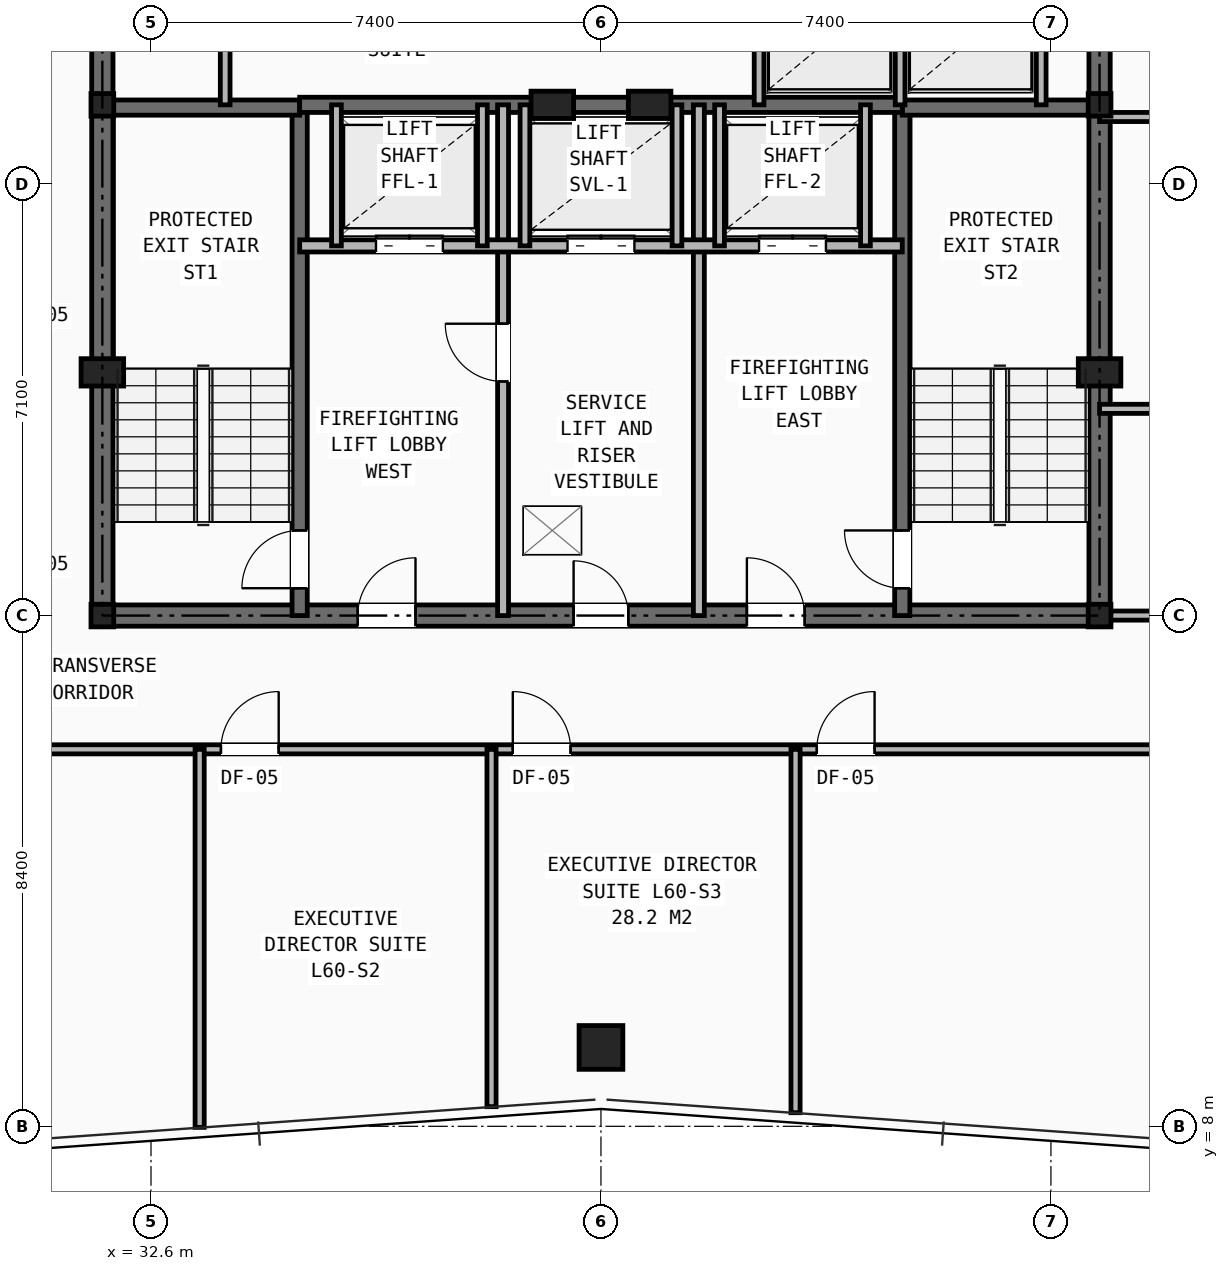
"""IFC4 building model, lengths in metres.
Left out: names, types, materials, properties, quantities, classifications, styles, units other than length and angle.
Written with IfcOpenShell. Run it as: python <this file> out.ifc"""

import sys

from ifc_helpers import new_model, si_unit, direction, frame, frame_2d, origin, origin_2d, place, context, subcontext, project, spatial, rectangle, hollow_rectangle, i_section, extrude, element, fill, save


model = new_model("IFC4")
c1 = context("Model", 3, precision=1e-05, world=origin(), true_north=direction((0.0, 1.0)))
c2 = subcontext(c1, "Body", "Model", "MODEL_VIEW")
j1 = project(units=[si_unit("LENGTHUNIT", "METRE"), si_unit("PLANEANGLEUNIT", "RADIAN")], contexts=[c1])
p1 = place(None, origin())
s1 = spatial("IfcSite", under=j1, at=p1, CompositionType="ELEMENT")
p2 = place(p1, origin())
s2 = spatial("IfcBuilding", under=s1, at=p2, CompositionType="ELEMENT")
p3 = place(p2, frame((0.0, 0.0, 211.9)))
s3 = spatial("IfcBuildingStorey", under=s2, at=p3, CompositionType="ELEMENT", Elevation=211.9)
for number, where, z_axis, x_axis in (
    (1, (31.8, 16.4, 0.0), (0.0, 0.0, 1.0), (1.0, 0.0, 0.0)),
    (2, (48.2, 16.4, 0.0), (0.0, 0.0, 1.0), (1.0, 0.0, 0.0)),
    (3, (31.8, 24.8, 0.0), (0.0, 0.0, 1.0), (1.0, 0.0, 0.0)),
    (4, (48.2, 24.8, 0.0), (0.0, 0.0, 1.0), (1.0, 0.0, 0.0)),
):
    element("IfcColumn", number, at=place(p3, frame(where, z_axis=z_axis, x_axis=x_axis)), inside=s3, PredefinedType="COLUMN", context=c2, shape_type="SweptSolid", body=[
        extrude(i_section(OverallWidth=0.374, OverallDepth=0.372, WebThickness=0.016, FlangeThickness=0.026, at=origin_2d()), origin(), (0.0, 0.0, 1.0), 3.5),
    ])
for number, where, z_axis, x_axis in (
    (5, (31.8, 20.4, 0.0), (0.0, 0.0, 1.0), (1.0, 0.0, 0.0)),
    (6, (48.2, 20.4, 0.0), (0.0, 0.0, 1.0), (1.0, 0.0, 0.0)),
    (7, (39.2, 24.8, 0.0), (0.0, 0.0, 1.0), (1.0, 0.0, 0.0)),
    (8, (40.8, 24.8, 0.0), (0.0, 0.0, 1.0), (1.0, 0.0, 0.0)),
):
    element("IfcColumn", number, at=place(p3, frame(where, z_axis=z_axis, x_axis=x_axis)), inside=s3, PredefinedType="PILASTER", context=c2, shape_type="SweptSolid", body=[
        extrude(rectangle(XDim=0.7, YDim=0.45, at=origin_2d()), origin(), (0.0, 0.0, 1.0), 3.5),
    ])
p4 = place(p3, frame((40.0, 9.297, 0.0), z_axis=(0.0, 0.0, 1.0), x_axis=(1.0, 0.0, 0.0)))
e9 = element("IfcColumn", 9, at=p4, inside=s3, PredefinedType="COLUMN", context=c2, shape_type="SweptSolid", body=[
    extrude(hollow_rectangle(XDim=0.72, YDim=0.72, WallThickness=0.05, at=origin_2d()), origin(), (0.0, 0.0, 1.0), 3.5),
])
p5 = place(p3, frame((31.8, 16.4, 0.0), z_axis=(0.0, 0.0, 1.0), x_axis=(1.0, 0.0, 0.0)))
e10 = element("IfcWall", 10, at=p5, inside=s3, PredefinedType="SHEAR", context=c2, shape_type="SweptSolid", body=[
    extrude(rectangle(XDim=16.4, YDim=0.35, at=frame_2d((8.2, 0.0))), origin(), (0.0, 0.0, 1.0), 3.25),
])
p6 = place(p5, frame((7.75, 0.0, 0.0)))
e11 = element("IfcOpeningElement", 11, at=p6, cuts=e10, PredefinedType="OPENING", context=c2, shape_type="SweptSolid", body=[
    extrude(rectangle(XDim=0.9, YDim=2.1, at=frame_2d((0.45, 1.05))), frame((0.0, 0.185, 0.0), z_axis=(0.0, -1.0, 0.0), x_axis=(1.0, 0.0, 0.0)), (0.0, 0.0, 1.0), 0.37),
])
p7 = place(p5, frame((4.2, 0.0, 0.0)))
e12 = element("IfcOpeningElement", 12, at=p7, cuts=e10, PredefinedType="OPENING", context=c2, shape_type="SweptSolid", body=[
    extrude(rectangle(XDim=0.95, YDim=2.1, at=frame_2d((0.475, 1.05))), frame((0.0, 0.185, 0.0), z_axis=(0.0, -1.0, 0.0), x_axis=(1.0, 0.0, 0.0)), (0.0, 0.0, 1.0), 0.37),
])
p8 = place(p5, frame((10.6, 0.0, 0.0)))
e13 = element("IfcOpeningElement", 13, at=p8, cuts=e10, PredefinedType="OPENING", context=c2, shape_type="SweptSolid", body=[
    extrude(rectangle(XDim=0.95, YDim=2.1, at=frame_2d((0.475, 1.05))), frame((0.0, 0.185, 0.0), z_axis=(0.0, -1.0, 0.0), x_axis=(1.0, 0.0, 0.0)), (0.0, 0.0, 1.0), 0.37),
])
p9 = place(p3, frame((31.8, 16.4, 0.0), z_axis=(0.0, 0.0, 1.0), x_axis=(0.0, 1.0, 0.0)))
e14 = element("IfcWall", 14, at=p9, inside=s3, PredefinedType="SHEAR", context=c2, shape_type="SweptSolid", body=[
    extrude(rectangle(XDim=14.8, YDim=0.35, at=frame_2d((7.4, 0.0))), origin(), (0.0, 0.0, 1.0), 3.25),
])
p10 = place(p9, frame((11.0, 0.0, 0.0)))
e15 = element("IfcOpeningElement", 15, at=p10, cuts=e14, PredefinedType="OPENING", context=c2, shape_type="SweptSolid", body=[
    extrude(rectangle(XDim=1.1, YDim=2.15, at=frame_2d((0.55, 1.075))), frame((0.0, 0.185, 0.0), z_axis=(0.0, -1.0, 0.0), x_axis=(1.0, 0.0, 0.0)), (0.0, 0.0, 1.0), 0.37),
])
p11 = place(p3, frame((48.2, 16.4, 0.0), z_axis=(0.0, 0.0, 1.0), x_axis=(0.0, 1.0, 0.0)))
e16 = element("IfcWall", 16, at=p11, inside=s3, PredefinedType="SHEAR", context=c2, shape_type="SweptSolid", body=[
    extrude(rectangle(XDim=14.8, YDim=0.35, at=frame_2d((7.4, 0.0))), origin(), (0.0, 0.0, 1.0), 3.25),
])
p12 = place(p11, frame((11.0, 0.0, 0.0)))
e17 = element("IfcOpeningElement", 17, at=p12, cuts=e16, PredefinedType="OPENING", context=c2, shape_type="SweptSolid", body=[
    extrude(rectangle(XDim=1.1, YDim=2.15, at=frame_2d((0.55, 1.075))), frame((0.0, 0.185, 0.0), z_axis=(0.0, -1.0, 0.0), x_axis=(1.0, 0.0, 0.0)), (0.0, 0.0, 1.0), 0.37),
])
p13 = place(p3, frame((35.045, 16.4, 0.0), z_axis=(0.0, 0.0, 1.0), x_axis=(0.0, 1.0, 0.0)))
e18 = element("IfcWall", 18, at=p13, inside=s3, PredefinedType="SHEAR", context=c2, shape_type="SweptSolid", body=[
    extrude(rectangle(XDim=8.4, YDim=0.25, at=frame_2d((4.2, 0.0))), origin(), (0.0, 0.0, 1.0), 3.25),
])
p14 = place(p13, frame((0.45, 0.0, 0.0)))
e19 = element("IfcOpeningElement", 19, at=p14, cuts=e18, PredefinedType="OPENING", context=c2, shape_type="SweptSolid", body=[
    extrude(rectangle(XDim=0.95, YDim=2.1, at=frame_2d((0.475, 1.05))), frame((0.0, 0.135, 0.0), z_axis=(0.0, -1.0, 0.0), x_axis=(1.0, 0.0, 0.0)), (0.0, 0.0, 1.0), 0.27),
])
p15 = place(p3, frame((31.8, 24.755, 0.0), z_axis=(0.0, 0.0, 1.0), x_axis=(1.0, 0.0, 0.0)))
e20 = element("IfcWall", 20, at=p15, inside=s3, PredefinedType="SHEAR", context=c2, shape_type="SweptSolid", body=[
    extrude(rectangle(XDim=3.245, YDim=0.25, at=frame_2d((1.623, 0.0))), origin(), (0.0, 0.0, 1.0), 3.25),
])
p16 = place(p3, frame((44.955, 16.4, 0.0), z_axis=(0.0, 0.0, 1.0), x_axis=(0.0, 1.0, 0.0)))
e21 = element("IfcWall", 21, at=p16, inside=s3, PredefinedType="SHEAR", context=c2, shape_type="SweptSolid", body=[
    extrude(rectangle(XDim=8.4, YDim=0.25, at=frame_2d((4.2, 0.0))), origin(), (0.0, 0.0, 1.0), 3.25),
])
p17 = place(p16, frame((0.45, 0.0, 0.0)))
e22 = element("IfcOpeningElement", 22, at=p17, cuts=e21, PredefinedType="OPENING", context=c2, shape_type="SweptSolid", body=[
    extrude(rectangle(XDim=0.95, YDim=2.1, at=frame_2d((0.475, 1.05))), frame((0.0, 0.135, 0.0), z_axis=(0.0, -1.0, 0.0), x_axis=(1.0, 0.0, 0.0)), (0.0, 0.0, 1.0), 0.27),
])
p18 = place(p3, frame((44.955, 24.755, 0.0), z_axis=(0.0, 0.0, 1.0), x_axis=(1.0, 0.0, 0.0)))
e23 = element("IfcWall", 23, at=p18, inside=s3, PredefinedType="SHEAR", context=c2, shape_type="SweptSolid", body=[
    extrude(rectangle(XDim=3.245, YDim=0.25, at=frame_2d((1.623, 0.0))), origin(), (0.0, 0.0, 1.0), 3.25),
])
p19 = place(p3, frame((35.045, 24.8, 0.0), z_axis=(0.0, 0.0, 1.0), x_axis=(1.0, 0.0, 0.0)))
e24 = element("IfcWall", 24, at=p19, inside=s3, PredefinedType="SHEAR", context=c2, shape_type="SweptSolid", body=[
    extrude(rectangle(XDim=9.91, YDim=0.25, at=frame_2d((4.955, 0.0))), origin(), (0.0, 0.0, 1.0), 3.25),
])
p20 = place(p3, frame((38.39, 16.4, 0.0), z_axis=(0.0, 0.0, 1.0), x_axis=(0.0, 1.0, 0.0)))
e25 = element("IfcWall", 25, at=p20, inside=s3, PredefinedType="PARTITIONING", context=c2, shape_type="SweptSolid", body=[
    extrude(rectangle(XDim=8.4, YDim=0.18, at=frame_2d((4.2, 0.0))), origin(), (0.0, 0.0, 1.0), 2.978),
])
p21 = place(p20, frame((3.85, 0.0, 0.0)))
e26 = element("IfcOpeningElement", 26, at=p21, cuts=e25, PredefinedType="OPENING", context=c2, shape_type="SweptSolid", body=[
    extrude(rectangle(XDim=0.95, YDim=2.1, at=frame_2d((0.475, 1.05))), frame((0.0, 0.1, 0.0), z_axis=(0.0, -1.0, 0.0), x_axis=(1.0, 0.0, 0.0)), (0.0, 0.0, 1.0), 0.2),
])
p22 = place(p3, frame((41.61, 16.4, 0.0), z_axis=(0.0, 0.0, 1.0), x_axis=(0.0, 1.0, 0.0)))
e27 = element("IfcWall", 27, at=p22, inside=s3, PredefinedType="PARTITIONING", context=c2, shape_type="SweptSolid", body=[
    extrude(rectangle(XDim=8.4, YDim=0.18, at=frame_2d((4.2, 0.0))), origin(), (0.0, 0.0, 1.0), 2.978),
])
p23 = place(p3, frame((35.045, 22.48, 0.0), z_axis=(0.0, 0.0, 1.0), x_axis=(1.0, 0.0, 0.0)))
e28 = element("IfcWall", 28, at=p23, inside=s3, PredefinedType="SOLIDWALL", context=c2, shape_type="SweptSolid", body=[
    extrude(rectangle(XDim=9.91, YDim=0.2, at=frame_2d((4.955, 0.0))), origin(), (0.0, 0.0, 1.0), 3.25),
])
p24 = place(p23, frame((1.255, 0.0, 0.0)))
e29 = element("IfcOpeningElement", 29, at=p24, cuts=e28, PredefinedType="OPENING", context=c2, shape_type="SweptSolid", body=[
    extrude(rectangle(XDim=1.1, YDim=2.15, at=frame_2d((0.55, 1.075))), frame((0.0, 0.11, 0.0), z_axis=(0.0, -1.0, 0.0), x_axis=(1.0, 0.0, 0.0)), (0.0, 0.0, 1.0), 0.22),
])
p25 = place(p23, frame((7.555, 0.0, 0.0)))
e30 = element("IfcOpeningElement", 30, at=p25, cuts=e28, PredefinedType="OPENING", context=c2, shape_type="SweptSolid", body=[
    extrude(rectangle(XDim=1.1, YDim=2.15, at=frame_2d((0.55, 1.075))), frame((0.0, 0.11, 0.0), z_axis=(0.0, -1.0, 0.0), x_axis=(1.0, 0.0, 0.0)), (0.0, 0.0, 1.0), 0.22),
])
p26 = place(p23, frame((4.405, 0.0, 0.0)))
e31 = element("IfcOpeningElement", 31, at=p26, cuts=e28, PredefinedType="OPENING", context=c2, shape_type="SweptSolid", body=[
    extrude(rectangle(XDim=1.1, YDim=2.15, at=frame_2d((0.55, 1.075))), frame((0.0, 0.11, 0.0), z_axis=(0.0, -1.0, 0.0), x_axis=(1.0, 0.0, 0.0)), (0.0, 0.0, 1.0), 0.22),
])
for number, where, z_axis, x_axis in (
    (32, (35.65, 22.48, 0.0), (0.0, 0.0, 1.0), (0.0, 1.0, 0.0)),
    (33, (38.05, 22.48, 0.0), (0.0, 0.0, 1.0), (0.0, 1.0, 0.0)),
    (34, (41.95, 22.48, 0.0), (0.0, 0.0, 1.0), (0.0, 1.0, 0.0)),
    (35, (44.35, 22.48, 0.0), (0.0, 0.0, 1.0), (0.0, 1.0, 0.0)),
    (36, (38.75, 22.48, 0.0), (0.0, 0.0, 1.0), (0.0, 1.0, 0.0)),
    (37, (41.25, 22.48, 0.0), (0.0, 0.0, 1.0), (0.0, 1.0, 0.0)),
):
    element("IfcWall", number, at=place(p3, frame(where, z_axis=z_axis, x_axis=x_axis)), inside=s3, PredefinedType="SOLIDWALL", context=c2, shape_type="SweptSolid", body=[
        extrude(rectangle(XDim=2.32, YDim=0.16, at=frame_2d((1.16, 0.0))), origin(), (0.0, 0.0, 1.0), 3.25),
    ])
for number, where, z_axis, x_axis in (
    (38, (33.82, 24.8, 0.0), (0.0, 0.0, 1.0), (0.0, 1.0, 0.0)),
    (39, (42.6, 24.8, 0.0), (0.0, 0.0, 1.0), (0.0, 1.0, 0.0)),
    (40, (44.92, 24.8, 0.0), (0.0, 0.0, 1.0), (0.0, 1.0, 0.0)),
    (41, (47.24, 24.8, 0.0), (0.0, 0.0, 1.0), (0.0, 1.0, 0.0)),
):
    element("IfcWall", number, at=place(p3, frame(where, z_axis=z_axis, x_axis=x_axis)), inside=s3, PredefinedType="SOLIDWALL", context=c2, shape_type="SweptSolid", body=[
        extrude(rectangle(XDim=2.08, YDim=0.16, at=frame_2d((1.04, 0.0))), origin(), (0.0, 0.0, 1.0), 3.25),
    ])
p27 = place(p3, frame((48.2, 16.4, 0.0), z_axis=(0.0, 0.0, 1.0), x_axis=(1.0, 0.0, 0.0)))
e42 = element("IfcWall", 42, at=p27, inside=s3, PredefinedType="PARTITIONING", context=c2, shape_type="SweptSolid", body=[
    extrude(rectangle(XDim=16.034, YDim=0.15, at=frame_2d((8.017, 0.0))), origin(), (0.0, 0.0, 1.0), 2.265),
])
p28 = place(p3, frame((25.5, 14.2, 0.0), z_axis=(0.0, 0.0, 1.0), x_axis=(1.0, 0.0, 0.0)))
e43 = element("IfcWall", 43, at=p28, inside=s3, PredefinedType="PARTITIONING", context=c2, shape_type="SweptSolid", body=[
    extrude(rectangle(XDim=29.0, YDim=0.15, at=frame_2d((14.5, 0.0))), origin(), (0.0, 0.0, 1.0), 2.265),
])
p29 = place(p28, frame((0.85, 0.0, 0.0)))
e44 = element("IfcOpeningElement", 44, at=p29, cuts=e43, PredefinedType="OPENING", context=c2, shape_type="SweptSolid", body=[
    extrude(rectangle(XDim=0.95, YDim=2.1, at=frame_2d((0.475, 1.05))), frame((0.0, 0.085, 0.0), z_axis=(0.0, -1.0, 0.0), x_axis=(1.0, 0.0, 0.0)), (0.0, 0.0, 1.0), 0.17),
])
p30 = place(p28, frame((8.25, 0.0, 0.0)))
e45 = element("IfcOpeningElement", 45, at=p30, cuts=e43, PredefinedType="OPENING", context=c2, shape_type="SweptSolid", body=[
    extrude(rectangle(XDim=0.95, YDim=2.1, at=frame_2d((0.475, 1.05))), frame((0.0, 0.085, 0.0), z_axis=(0.0, -1.0, 0.0), x_axis=(1.0, 0.0, 0.0)), (0.0, 0.0, 1.0), 0.17),
])
p31 = place(p28, frame((13.05, 0.0, 0.0)))
e46 = element("IfcOpeningElement", 46, at=p31, cuts=e43, PredefinedType="OPENING", context=c2, shape_type="SweptSolid", body=[
    extrude(rectangle(XDim=0.95, YDim=2.1, at=frame_2d((0.475, 1.05))), frame((0.0, 0.085, 0.0), z_axis=(0.0, -1.0, 0.0), x_axis=(1.0, 0.0, 0.0)), (0.0, 0.0, 1.0), 0.17),
])
p32 = place(p28, frame((18.05, 0.0, 0.0)))
e47 = element("IfcOpeningElement", 47, at=p32, cuts=e43, PredefinedType="OPENING", context=c2, shape_type="SweptSolid", body=[
    extrude(rectangle(XDim=0.95, YDim=2.1, at=frame_2d((0.475, 1.05))), frame((0.0, 0.085, 0.0), z_axis=(0.0, -1.0, 0.0), x_axis=(1.0, 0.0, 0.0)), (0.0, 0.0, 1.0), 0.17),
])
p33 = place(p3, frame((33.4, 7.982, 0.0), z_axis=(0.0, 0.0, 1.0), x_axis=(0.0, 1.0, 0.0)))
e48 = element("IfcWall", 48, at=p33, inside=s3, PredefinedType="PARTITIONING", context=c2, shape_type="SweptSolid", body=[
    extrude(rectangle(XDim=6.218, YDim=0.15, at=frame_2d((3.109, 0.0))), origin(), (0.0, 0.0, 1.0), 2.628),
])
p34 = place(p3, frame((38.2, 8.323, 0.0), z_axis=(0.0, 0.0, 1.0), x_axis=(0.0, 1.0, 0.0)))
e49 = element("IfcWall", 49, at=p34, inside=s3, PredefinedType="PARTITIONING", context=c2, shape_type="SweptSolid", body=[
    extrude(rectangle(XDim=5.877, YDim=0.15, at=frame_2d((2.938, 0.0))), origin(), (0.0, 0.0, 1.0), 2.265),
])
p35 = place(p3, frame((43.2, 8.224, 0.0), z_axis=(0.0, 0.0, 1.0), x_axis=(0.0, 1.0, 0.0)))
e50 = element("IfcWall", 50, at=p35, inside=s3, PredefinedType="PARTITIONING", context=c2, shape_type="SweptSolid", body=[
    extrude(rectangle(XDim=5.976, YDim=0.15, at=frame_2d((2.988, 0.0))), origin(), (0.0, 0.0, 1.0), 2.628),
])
p36 = place(p3, frame((48.2, 19.8, 0.0), z_axis=(0.0, 0.0, 1.0), x_axis=(1.0, 0.0, 0.0)))
e51 = element("IfcWall", 51, at=p36, inside=s3, PredefinedType="PARTITIONING", context=c2, shape_type="SweptSolid", body=[
    extrude(rectangle(XDim=13.736, YDim=0.15, at=frame_2d((6.868, 0.0))), origin(), (0.0, 0.0, 1.0), 2.265),
])
p37 = place(p36, frame((1.4, 0.0, 0.0)))
e52 = element("IfcOpeningElement", 52, at=p37, cuts=e51, PredefinedType="OPENING", context=c2, shape_type="SweptSolid", body=[
    extrude(rectangle(XDim=0.95, YDim=2.1, at=frame_2d((0.475, 1.05))), frame((0.0, 0.085, 0.0), z_axis=(0.0, -1.0, 0.0), x_axis=(1.0, 0.0, 0.0)), (0.0, 0.0, 1.0), 0.17),
])
p38 = place(p3, frame((48.2, 24.6, 0.0), z_axis=(0.0, 0.0, 1.0), x_axis=(1.0, 0.0, 0.0)))
e53 = element("IfcWall", 53, at=p38, inside=s3, PredefinedType="PARTITIONING", context=c2, shape_type="SweptSolid", body=[
    extrude(rectangle(XDim=10.492, YDim=0.15, at=frame_2d((5.246, 0.0))), origin(), (0.0, 0.0, 1.0), 2.628),
])
p39 = place(p38, frame((1.4, 0.0, 0.0)))
e54 = element("IfcOpeningElement", 54, at=p39, cuts=e53, PredefinedType="OPENING", context=c2, shape_type="SweptSolid", body=[
    extrude(rectangle(XDim=0.95, YDim=2.1, at=frame_2d((0.475, 1.05))), frame((0.0, 0.085, 0.0), z_axis=(0.0, -1.0, 0.0), x_axis=(1.0, 0.0, 0.0)), (0.0, 0.0, 1.0), 0.17),
])
p40 = place(p6, origin())
e55 = element("IfcDoor", 55, at=p40, inside=s3, OperationType="SINGLE_SWING_LEFT", PredefinedType="DOOR", context=c2, shape_type="SweptSolid", body=[
    extrude(rectangle(XDim=0.9, YDim=2.1, at=frame_2d((0.45, 1.05))), frame((0.0, 0.025, 0.0), z_axis=(0.0, -1.0, 0.0), x_axis=(1.0, 0.0, 0.0)), (0.0, 0.0, 1.0), 0.05),
])
fill(e11, e55)
p41 = place(p21, origin())
e56 = element("IfcDoor", 56, at=p41, inside=s3, OperationType="SINGLE_SWING_RIGHT", PredefinedType="DOOR", context=c2, shape_type="SweptSolid", body=[
    extrude(rectangle(XDim=0.95, YDim=2.1, at=frame_2d((0.475, 1.05))), frame((0.0, 0.025, 0.0), z_axis=(0.0, -1.0, 0.0), x_axis=(1.0, 0.0, 0.0)), (0.0, 0.0, 1.0), 0.05),
])
fill(e26, e56)
p42 = place(p14, origin())
e57 = element("IfcDoor", 57, at=p42, inside=s3, OperationType="SINGLE_SWING_LEFT", PredefinedType="DOOR", context=c2, shape_type="SweptSolid", body=[
    extrude(rectangle(XDim=0.95, YDim=2.1, at=frame_2d((0.475, 1.05))), frame((0.0, 0.025, 0.0), z_axis=(0.0, -1.0, 0.0), x_axis=(1.0, 0.0, 0.0)), (0.0, 0.0, 1.0), 0.05),
])
fill(e19, e57)
p43 = place(p17, origin())
e58 = element("IfcDoor", 58, at=p43, inside=s3, OperationType="SINGLE_SWING_RIGHT", PredefinedType="DOOR", context=c2, shape_type="SweptSolid", body=[
    extrude(rectangle(XDim=0.95, YDim=2.1, at=frame_2d((0.475, 1.05))), frame((0.0, 0.025, 0.0), z_axis=(0.0, -1.0, 0.0), x_axis=(1.0, 0.0, 0.0)), (0.0, 0.0, 1.0), 0.05),
])
fill(e22, e58)
p44 = place(p7, origin())
e59 = element("IfcDoor", 59, at=p44, inside=s3, OperationType="SINGLE_SWING_RIGHT", PredefinedType="DOOR", context=c2, shape_type="SweptSolid", body=[
    extrude(rectangle(XDim=0.95, YDim=2.1, at=frame_2d((0.475, 1.05))), frame((0.0, 0.025, 0.0), z_axis=(0.0, -1.0, 0.0), x_axis=(1.0, 0.0, 0.0)), (0.0, 0.0, 1.0), 0.05),
])
fill(e12, e59)
p45 = place(p8, origin())
e60 = element("IfcDoor", 60, at=p45, inside=s3, OperationType="SINGLE_SWING_LEFT", PredefinedType="DOOR", context=c2, shape_type="SweptSolid", body=[
    extrude(rectangle(XDim=0.95, YDim=2.1, at=frame_2d((0.475, 1.05))), frame((0.0, 0.025, 0.0), z_axis=(0.0, -1.0, 0.0), x_axis=(1.0, 0.0, 0.0)), (0.0, 0.0, 1.0), 0.05),
])
fill(e13, e60)
p46 = place(p24, origin())
e61 = element("IfcDoor", 61, at=p46, inside=s3, OperationType="DOUBLE_DOOR_SLIDING", PredefinedType="DOOR", context=c2, shape_type="SweptSolid", body=[
    extrude(rectangle(XDim=1.1, YDim=2.15, at=frame_2d((0.55, 1.075))), frame((0.0, 0.025, 0.0), z_axis=(0.0, -1.0, 0.0), x_axis=(1.0, 0.0, 0.0)), (0.0, 0.0, 1.0), 0.05),
])
fill(e29, e61)
p47 = place(p25, origin())
e62 = element("IfcDoor", 62, at=p47, inside=s3, OperationType="DOUBLE_DOOR_SLIDING", PredefinedType="DOOR", context=c2, shape_type="SweptSolid", body=[
    extrude(rectangle(XDim=1.1, YDim=2.15, at=frame_2d((0.55, 1.075))), frame((0.0, 0.025, 0.0), z_axis=(0.0, -1.0, 0.0), x_axis=(1.0, 0.0, 0.0)), (0.0, 0.0, 1.0), 0.05),
])
fill(e30, e62)
p48 = place(p26, origin())
e63 = element("IfcDoor", 63, at=p48, inside=s3, OperationType="DOUBLE_DOOR_SLIDING", PredefinedType="DOOR", context=c2, shape_type="SweptSolid", body=[
    extrude(rectangle(XDim=1.1, YDim=2.15, at=frame_2d((0.55, 1.075))), frame((0.0, 0.025, 0.0), z_axis=(0.0, -1.0, 0.0), x_axis=(1.0, 0.0, 0.0)), (0.0, 0.0, 1.0), 0.05),
])
fill(e31, e63)
p49 = place(p30, origin())
e64 = element("IfcDoor", 64, at=p49, inside=s3, OperationType="SINGLE_SWING_RIGHT", PredefinedType="DOOR", context=c2, shape_type="SweptSolid", body=[
    extrude(rectangle(XDim=0.95, YDim=2.1, at=frame_2d((0.475, 1.05))), frame((0.0, 0.025, 0.0), z_axis=(0.0, -1.0, 0.0), x_axis=(1.0, 0.0, 0.0)), (0.0, 0.0, 1.0), 0.05),
])
fill(e45, e64)
p50 = place(p31, origin())
e65 = element("IfcDoor", 65, at=p50, inside=s3, OperationType="SINGLE_SWING_LEFT", PredefinedType="DOOR", context=c2, shape_type="SweptSolid", body=[
    extrude(rectangle(XDim=0.95, YDim=2.1, at=frame_2d((0.475, 1.05))), frame((0.0, 0.025, 0.0), z_axis=(0.0, -1.0, 0.0), x_axis=(1.0, 0.0, 0.0)), (0.0, 0.0, 1.0), 0.05),
])
fill(e46, e65)
p51 = place(p32, origin())
e66 = element("IfcDoor", 66, at=p51, inside=s3, OperationType="SINGLE_SWING_RIGHT", PredefinedType="DOOR", context=c2, shape_type="SweptSolid", body=[
    extrude(rectangle(XDim=0.95, YDim=2.1, at=frame_2d((0.475, 1.05))), frame((0.0, 0.025, 0.0), z_axis=(0.0, -1.0, 0.0), x_axis=(1.0, 0.0, 0.0)), (0.0, 0.0, 1.0), 0.05),
])
fill(e47, e66)
save(model, sys.argv[1])
